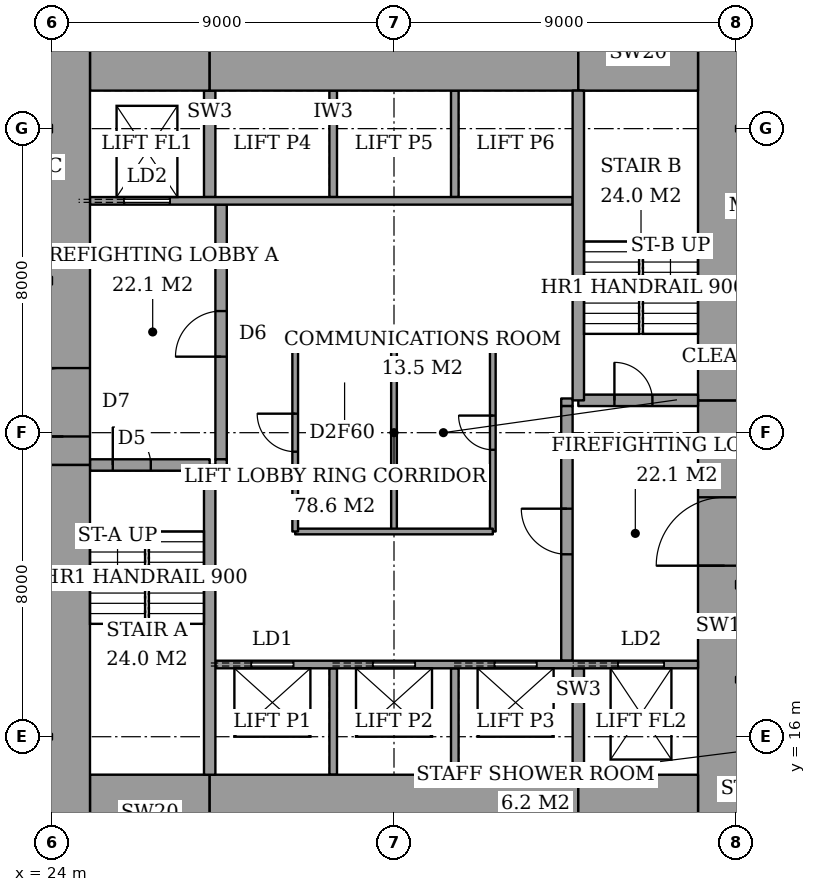
"""IFC4 building model, lengths in metres.
Left out: names, types, materials, properties, quantities, classifications, styles, units other than length and angle.
Written with IfcOpenShell. Run it as: python <this file> out.ifc"""

import sys

from ifc_helpers import new_model, si_unit, direction, frame, frame_2d, origin, place, context, subcontext, project, spatial, rectangle, extrude, element, fill, save


model = new_model("IFC4")
c1 = context("Model", 3, precision=1e-05, world=origin(), true_north=direction((0.0, 1.0)))
c2 = subcontext(c1, "Body", "Model", "MODEL_VIEW")
j1 = project(units=[si_unit("LENGTHUNIT", "METRE"), si_unit("PLANEANGLEUNIT", "RADIAN")], contexts=[c1])
p1 = place(None, origin())
s1 = spatial("IfcSite", under=j1, at=p1, CompositionType="ELEMENT")
p2 = place(p1, origin())
s2 = spatial("IfcBuilding", under=s1, at=p2, CompositionType="ELEMENT")
p3 = place(p2, frame((0.0, 0.0, 153.8)))
s3 = spatial("IfcBuildingStorey", under=s2, at=p3, CompositionType="ELEMENT", Elevation=153.8)
p4 = place(p3, frame((25.0, 14.0, 0.0), z_axis=(0.0, 0.0, 1.0), x_axis=(1.0, 0.0, 0.0)))
e1 = element("IfcWall", 1, at=p4, inside=s3, PredefinedType="SHEAR", context=c2, shape_type="SweptSolid", body=[
    extrude(rectangle(XDim=3.15, YDim=2.0, at=frame_2d((1.575, 0.0))), origin(), (0.0, 0.0, 1.0), 3.6),
])
p5 = place(p3, frame((28.15, 14.0, 0.0), z_axis=(0.0, 0.0, 1.0), x_axis=(1.0, 0.0, 0.0)))
e2 = element("IfcWall", 2, at=p5, inside=s3, PredefinedType="SHEAR", context=c2, shape_type="SweptSolid", body=[
    extrude(rectangle(XDim=9.7, YDim=2.0, at=frame_2d((4.85, 0.0))), origin(), (0.0, 0.0, 1.0), 3.6),
])
for number, where, z_axis, x_axis in (
    (3, (37.85, 14.0, 0.0), (0.0, 0.0, 1.0), (1.0, 0.0, 0.0)),
    (4, (25.0, 34.0, 0.0), (0.0, 0.0, 1.0), (1.0, 0.0, 0.0)),
):
    element("IfcWall", number, at=place(p3, frame(where, z_axis=z_axis, x_axis=x_axis)), inside=s3, PredefinedType="SHEAR", context=c2, shape_type="SweptSolid", body=[
        extrude(rectangle(XDim=3.15, YDim=2.0, at=frame_2d((1.575, 0.0))), origin(), (0.0, 0.0, 1.0), 3.6),
    ])
p6 = place(p3, frame((28.15, 34.0, 0.0), z_axis=(0.0, 0.0, 1.0), x_axis=(1.0, 0.0, 0.0)))
e5 = element("IfcWall", 5, at=p6, inside=s3, PredefinedType="SHEAR", context=c2, shape_type="SweptSolid", body=[
    extrude(rectangle(XDim=9.7, YDim=2.0, at=frame_2d((4.85, 0.0))), origin(), (0.0, 0.0, 1.0), 3.6),
])
p7 = place(p3, frame((37.85, 34.0, 0.0), z_axis=(0.0, 0.0, 1.0), x_axis=(1.0, 0.0, 0.0)))
e6 = element("IfcWall", 6, at=p7, inside=s3, PredefinedType="SHEAR", context=c2, shape_type="SweptSolid", body=[
    extrude(rectangle(XDim=3.15, YDim=2.0, at=frame_2d((1.575, 0.0))), origin(), (0.0, 0.0, 1.0), 3.6),
])
p8 = place(p3, frame((24.3, 13.0, 0.0), z_axis=(0.0, 0.0, 1.0), x_axis=(0.0, 1.0, 0.0)))
e7 = element("IfcWall", 7, at=p8, inside=s3, PredefinedType="SHEAR", context=c2, shape_type="SweptSolid", body=[
    extrude(rectangle(XDim=10.15, YDim=1.4, at=frame_2d((5.075, 0.0))), origin(), (0.0, 0.0, 1.0), 3.6),
])
p9 = place(p3, frame((24.3, 23.15, 0.0), z_axis=(0.0, 0.0, 1.0), x_axis=(0.0, 1.0, 0.0)))
e8 = element("IfcWall", 8, at=p9, inside=s3, PredefinedType="SHEAR", context=c2, shape_type="SweptSolid", body=[
    extrude(rectangle(XDim=11.85, YDim=1.4, at=frame_2d((5.925, 0.0))), origin(), (0.0, 0.0, 1.0), 3.6),
])
p10 = place(p9, frame((0.75, 0.0, 0.0)))
e9 = element("IfcOpeningElement", 9, at=p10, cuts=e8, PredefinedType="OPENING", context=c2, shape_type="SweptSolid", body=[
    extrude(rectangle(XDim=1.8, YDim=2.4, at=frame_2d((0.9, 1.2))), frame((0.0, 0.71, 0.0), z_axis=(0.0, -1.0, 0.0), x_axis=(1.0, 0.0, 0.0)), (0.0, 0.0, 1.0), 1.42),
])
p11 = place(p3, frame((41.7, 13.0, 0.0), z_axis=(0.0, 0.0, 1.0), x_axis=(0.0, 1.0, 0.0)))
e10 = element("IfcWall", 10, at=p11, inside=s3, PredefinedType="SHEAR", context=c2, shape_type="SweptSolid", body=[
    extrude(rectangle(XDim=11.85, YDim=1.4, at=frame_2d((5.925, 0.0))), origin(), (0.0, 0.0, 1.0), 3.6),
])
p12 = place(p11, frame((7.5, 0.0, 0.0)))
e11 = element("IfcOpeningElement", 11, at=p12, cuts=e10, PredefinedType="OPENING", context=c2, shape_type="SweptSolid", body=[
    extrude(rectangle(XDim=1.8, YDim=2.4, at=frame_2d((0.9, 1.2))), frame((0.0, 0.71, 0.0), z_axis=(0.0, -1.0, 0.0), x_axis=(1.0, 0.0, 0.0)), (0.0, 0.0, 1.0), 1.42),
])
p13 = place(p3, frame((41.7, 24.85, 0.0), z_axis=(0.0, 0.0, 1.0), x_axis=(0.0, 1.0, 0.0)))
e12 = element("IfcWall", 12, at=p13, inside=s3, PredefinedType="SHEAR", context=c2, shape_type="SweptSolid", body=[
    extrude(rectangle(XDim=10.15, YDim=1.4, at=frame_2d((5.075, 0.0))), origin(), (0.0, 0.0, 1.0), 3.6),
])
p14 = place(p3, frame((28.15, 15.0, 0.0), z_axis=(0.0, 0.0, 1.0), x_axis=(0.0, 1.0, 0.0)))
e13 = element("IfcWall", 13, at=p14, inside=s3, PredefinedType="SHEAR", context=c2, shape_type="SweptSolid", body=[
    extrude(rectangle(XDim=8.15, YDim=0.3, at=frame_2d((4.075, 0.0))), origin(), (0.0, 0.0, 1.0), 3.6),
])
p15 = place(p3, frame((25.0, 23.15, 0.0), z_axis=(0.0, 0.0, 1.0), x_axis=(1.0, 0.0, 0.0)))
e14 = element("IfcWall", 14, at=p15, inside=s3, PredefinedType="SHEAR", context=c2, shape_type="SweptSolid", body=[
    extrude(rectangle(XDim=3.15, YDim=0.3, at=frame_2d((1.575, 0.0))), origin(), (0.0, 0.0, 1.0), 3.6),
])
p16 = place(p15, frame((0.6, 0.0, 0.0)))
e15 = element("IfcOpeningElement", 15, at=p16, cuts=e14, PredefinedType="OPENING", context=c2, shape_type="SweptSolid", body=[
    extrude(rectangle(XDim=1.0, YDim=2.1, at=frame_2d((0.5, 1.05))), frame((0.0, 0.16, 0.0), z_axis=(0.0, -1.0, 0.0), x_axis=(1.0, 0.0, 0.0)), (0.0, 0.0, 1.0), 0.32),
])
p17 = place(p3, frame((37.85, 24.85, 0.0), z_axis=(0.0, 0.0, 1.0), x_axis=(0.0, 1.0, 0.0)))
e16 = element("IfcWall", 16, at=p17, inside=s3, PredefinedType="SHEAR", context=c2, shape_type="SweptSolid", body=[
    extrude(rectangle(XDim=8.15, YDim=0.3, at=frame_2d((4.075, 0.0))), origin(), (0.0, 0.0, 1.0), 3.6),
])
p18 = place(p3, frame((37.85, 24.85, 0.0), z_axis=(0.0, 0.0, 1.0), x_axis=(1.0, 0.0, 0.0)))
e17 = element("IfcWall", 17, at=p18, inside=s3, PredefinedType="SHEAR", context=c2, shape_type="SweptSolid", body=[
    extrude(rectangle(XDim=3.15, YDim=0.3, at=frame_2d((1.575, 0.0))), origin(), (0.0, 0.0, 1.0), 3.6),
])
p19 = place(p18, frame((0.95, 0.0, 0.0)))
e18 = element("IfcOpeningElement", 18, at=p19, cuts=e17, PredefinedType="OPENING", context=c2, shape_type="SweptSolid", body=[
    extrude(rectangle(XDim=1.0, YDim=2.1, at=frame_2d((0.5, 1.05))), frame((0.0, 0.16, 0.0), z_axis=(0.0, -1.0, 0.0), x_axis=(1.0, 0.0, 0.0)), (0.0, 0.0, 1.0), 0.32),
])
p20 = place(p3, frame((28.45, 23.3, 0.0), z_axis=(0.0, 0.0, 1.0), x_axis=(0.0, 1.0, 0.0)))
e19 = element("IfcWall", 19, at=p20, inside=s3, PredefinedType="PARTITIONING", context=c2, shape_type="SweptSolid", body=[
    extrude(rectangle(XDim=6.7, YDim=0.3, at=frame_2d((3.35, 0.0))), origin(), (0.0, 0.0, 1.0), 3.6),
])
p21 = place(p20, frame((2.7, 0.0, 0.0)))
e20 = element("IfcOpeningElement", 20, at=p21, cuts=e19, PredefinedType="OPENING", context=c2, shape_type="SweptSolid", body=[
    extrude(rectangle(XDim=1.2, YDim=2.1, at=frame_2d((0.6, 1.05))), frame((0.0, 0.16, 0.0), z_axis=(0.0, -1.0, 0.0), x_axis=(1.0, 0.0, 0.0)), (0.0, 0.0, 1.0), 0.32),
])
p22 = place(p3, frame((37.55, 18.0, 0.0), z_axis=(0.0, 0.0, 1.0), x_axis=(0.0, 1.0, 0.0)))
e21 = element("IfcWall", 21, at=p22, inside=s3, PredefinedType="PARTITIONING", context=c2, shape_type="SweptSolid", body=[
    extrude(rectangle(XDim=6.7, YDim=0.3, at=frame_2d((3.35, 0.0))), origin(), (0.0, 0.0, 1.0), 3.6),
])
p23 = place(p22, frame((2.8, 0.0, 0.0)))
e22 = element("IfcOpeningElement", 22, at=p23, cuts=e21, PredefinedType="OPENING", context=c2, shape_type="SweptSolid", body=[
    extrude(rectangle(XDim=1.2, YDim=2.1, at=frame_2d((0.6, 1.05))), frame((0.0, 0.16, 0.0), z_axis=(0.0, -1.0, 0.0), x_axis=(1.0, 0.0, 0.0)), (0.0, 0.0, 1.0), 0.32),
])
p24 = place(p3, frame((28.3, 17.9, 0.0), z_axis=(0.0, 0.0, 1.0), x_axis=(1.0, 0.0, 0.0)))
e23 = element("IfcWall", 23, at=p24, inside=s3, PredefinedType="PARTITIONING", context=c2, shape_type="SweptSolid", body=[
    extrude(rectangle(XDim=12.7, YDim=0.2, at=frame_2d((6.35, 0.0))), origin(), (0.0, 0.0, 1.0), 3.6),
])
p25 = place(p24, frame((0.95, 0.0, 0.0)))
e24 = element("IfcOpeningElement", 24, at=p25, cuts=e23, PredefinedType="OPENING", context=c2, shape_type="SweptSolid", body=[
    extrude(rectangle(XDim=1.1, YDim=2.1, at=frame_2d((0.55, 1.05))), frame((0.0, 0.11, 0.0), z_axis=(0.0, -1.0, 0.0), x_axis=(1.0, 0.0, 0.0)), (0.0, 0.0, 1.0), 0.22),
])
p26 = place(p24, frame((4.15, 0.0, 0.0)))
e25 = element("IfcOpeningElement", 25, at=p26, cuts=e23, PredefinedType="OPENING", context=c2, shape_type="SweptSolid", body=[
    extrude(rectangle(XDim=1.1, YDim=2.1, at=frame_2d((0.55, 1.05))), frame((0.0, 0.11, 0.0), z_axis=(0.0, -1.0, 0.0), x_axis=(1.0, 0.0, 0.0)), (0.0, 0.0, 1.0), 0.22),
])
p27 = place(p24, frame((7.35, 0.0, 0.0)))
e26 = element("IfcOpeningElement", 26, at=p27, cuts=e23, PredefinedType="OPENING", context=c2, shape_type="SweptSolid", body=[
    extrude(rectangle(XDim=1.1, YDim=2.1, at=frame_2d((0.55, 1.05))), frame((0.0, 0.11, 0.0), z_axis=(0.0, -1.0, 0.0), x_axis=(1.0, 0.0, 0.0)), (0.0, 0.0, 1.0), 0.22),
])
p28 = place(p24, frame((10.6, 0.0, 0.0)))
e27 = element("IfcOpeningElement", 27, at=p28, cuts=e23, PredefinedType="OPENING", context=c2, shape_type="SweptSolid", body=[
    extrude(rectangle(XDim=1.2, YDim=2.1, at=frame_2d((0.6, 1.05))), frame((0.0, 0.11, 0.0), z_axis=(0.0, -1.0, 0.0), x_axis=(1.0, 0.0, 0.0)), (0.0, 0.0, 1.0), 0.22),
])
p29 = place(p3, frame((25.0, 30.1, 0.0), z_axis=(0.0, 0.0, 1.0), x_axis=(1.0, 0.0, 0.0)))
e28 = element("IfcWall", 28, at=p29, inside=s3, PredefinedType="PARTITIONING", context=c2, shape_type="SweptSolid", body=[
    extrude(rectangle(XDim=12.7, YDim=0.2, at=frame_2d((6.35, 0.0))), origin(), (0.0, 0.0, 1.0), 3.6),
])
p30 = place(p29, frame((0.9, 0.0, 0.0)))
e29 = element("IfcOpeningElement", 29, at=p30, cuts=e28, PredefinedType="OPENING", context=c2, shape_type="SweptSolid", body=[
    extrude(rectangle(XDim=1.2, YDim=2.1, at=frame_2d((0.6, 1.05))), frame((0.0, 0.11, 0.0), z_axis=(0.0, -1.0, 0.0), x_axis=(1.0, 0.0, 0.0)), (0.0, 0.0, 1.0), 0.22),
])
for number, where, z_axis, x_axis in (
    (30, (31.4, 15.0, 0.0), (0.0, 0.0, 1.0), (0.0, 1.0, 0.0)),
    (31, (34.6, 15.0, 0.0), (0.0, 0.0, 1.0), (0.0, 1.0, 0.0)),
):
    element("IfcWall", number, at=place(p3, frame(where, z_axis=z_axis, x_axis=x_axis)), inside=s3, PredefinedType="PARTITIONING", context=c2, shape_type="SweptSolid", body=[
        extrude(rectangle(XDim=2.8, YDim=0.2, at=frame_2d((1.4, 0.0))), origin(), (0.0, 0.0, 1.0), 3.6),
    ])
p31 = place(p3, frame((37.85, 15.0, 0.0), z_axis=(0.0, 0.0, 1.0), x_axis=(0.0, 1.0, 0.0)))
e32 = element("IfcWall", 32, at=p31, inside=s3, PredefinedType="SHEAR", context=c2, shape_type="SweptSolid", body=[
    extrude(rectangle(XDim=2.8, YDim=0.3, at=frame_2d((1.4, 0.0))), origin(), (0.0, 0.0, 1.0), 3.6),
])
for number, where, z_axis, x_axis in (
    (33, (31.4, 30.2, 0.0), (0.0, 0.0, 1.0), (0.0, 1.0, 0.0)),
    (34, (34.6, 30.2, 0.0), (0.0, 0.0, 1.0), (0.0, 1.0, 0.0)),
):
    element("IfcWall", number, at=place(p3, frame(where, z_axis=z_axis, x_axis=x_axis)), inside=s3, PredefinedType="PARTITIONING", context=c2, shape_type="SweptSolid", body=[
        extrude(rectangle(XDim=2.8, YDim=0.2, at=frame_2d((1.4, 0.0))), origin(), (0.0, 0.0, 1.0), 3.6),
    ])
p32 = place(p3, frame((28.15, 30.2, 0.0), z_axis=(0.0, 0.0, 1.0), x_axis=(0.0, 1.0, 0.0)))
e35 = element("IfcWall", 35, at=p32, inside=s3, PredefinedType="SHEAR", context=c2, shape_type="SweptSolid", body=[
    extrude(rectangle(XDim=2.8, YDim=0.3, at=frame_2d((1.4, 0.0))), origin(), (0.0, 0.0, 1.0), 3.6),
])
for number, where, z_axis, x_axis in (
    (36, (28.3, 23.2, 0.0), (0.0, 0.0, 1.0), (1.0, 0.0, 0.0)),
    (37, (37.4, 24.8, 0.0), (0.0, 0.0, 1.0), (1.0, 0.0, 0.0)),
):
    element("IfcWall", number, at=place(p3, frame(where, z_axis=z_axis, x_axis=x_axis)), inside=s3, PredefinedType="PARTITIONING", context=c2, shape_type="SweptSolid", body=[
        extrude(rectangle(XDim=0.3, YDim=0.2, at=frame_2d((0.15, 0.0))), origin(), (0.0, 0.0, 1.0), 3.6),
    ])
for number, where, z_axis, x_axis in (
    (38, (30.4, 21.4, 0.0), (0.0, 0.0, 1.0), (1.0, 0.0, 0.0)),
    (39, (30.4, 26.6, 0.0), (0.0, 0.0, 1.0), (1.0, 0.0, 0.0)),
):
    element("IfcWall", number, at=place(p3, frame(where, z_axis=z_axis, x_axis=x_axis)), inside=s3, PredefinedType="PARTITIONING", context=c2, shape_type="SweptSolid", body=[
        extrude(rectangle(XDim=5.2, YDim=0.15, at=frame_2d((2.6, 0.0))), origin(), (0.0, 0.0, 1.0), 3.35),
    ])
p33 = place(p3, frame((30.4, 21.4, 0.0), z_axis=(0.0, 0.0, 1.0), x_axis=(0.0, 1.0, 0.0)))
e40 = element("IfcWall", 40, at=p33, inside=s3, PredefinedType="PARTITIONING", context=c2, shape_type="SweptSolid", body=[
    extrude(rectangle(XDim=5.2, YDim=0.15, at=frame_2d((2.6, 0.0))), origin(), (0.0, 0.0, 1.0), 3.35),
])
p34 = place(p33, frame((2.1, 0.0, 0.0)))
e41 = element("IfcOpeningElement", 41, at=p34, cuts=e40, PredefinedType="OPENING", context=c2, shape_type="SweptSolid", body=[
    extrude(rectangle(XDim=1.0, YDim=2.1, at=frame_2d((0.5, 1.05))), frame((0.0, 0.085, 0.0), z_axis=(0.0, -1.0, 0.0), x_axis=(1.0, 0.0, 0.0)), (0.0, 0.0, 1.0), 0.17),
])
p35 = place(p3, frame((35.6, 21.4, 0.0), z_axis=(0.0, 0.0, 1.0), x_axis=(0.0, 1.0, 0.0)))
e42 = element("IfcWall", 42, at=p35, inside=s3, PredefinedType="PARTITIONING", context=c2, shape_type="SweptSolid", body=[
    extrude(rectangle(XDim=5.2, YDim=0.15, at=frame_2d((2.6, 0.0))), origin(), (0.0, 0.0, 1.0), 3.35),
])
p36 = place(p35, frame((2.15, 0.0, 0.0)))
e43 = element("IfcOpeningElement", 43, at=p36, cuts=e42, PredefinedType="OPENING", context=c2, shape_type="SweptSolid", body=[
    extrude(rectangle(XDim=0.9, YDim=2.1, at=frame_2d((0.45, 1.05))), frame((0.0, 0.085, 0.0), z_axis=(0.0, -1.0, 0.0), x_axis=(1.0, 0.0, 0.0)), (0.0, 0.0, 1.0), 0.17),
])
p37 = place(p3, frame((33.0, 21.4, 0.0), z_axis=(0.0, 0.0, 1.0), x_axis=(0.0, 1.0, 0.0)))
e44 = element("IfcWall", 44, at=p37, inside=s3, PredefinedType="PARTITIONING", context=c2, shape_type="SweptSolid", body=[
    extrude(rectangle(XDim=5.2, YDim=0.15, at=frame_2d((2.6, 0.0))), origin(), (0.0, 0.0, 1.0), 3.35),
])
p38 = place(p16, origin())
e45 = element("IfcDoor", 45, at=p38, inside=s3, OperationType="SINGLE_SWING_RIGHT", PredefinedType="DOOR", context=c2, shape_type="SweptSolid", body=[
    extrude(rectangle(XDim=1.0, YDim=2.1, at=frame_2d((0.5, 1.05))), frame((0.0, 0.025, 0.0), z_axis=(0.0, -1.0, 0.0), x_axis=(1.0, 0.0, 0.0)), (0.0, 0.0, 1.0), 0.05),
])
fill(e15, e45)
p39 = place(p19, origin())
e46 = element("IfcDoor", 46, at=p39, inside=s3, OperationType="SINGLE_SWING_RIGHT", PredefinedType="DOOR", context=c2, shape_type="SweptSolid", body=[
    extrude(rectangle(XDim=1.0, YDim=2.1, at=frame_2d((0.5, 1.05))), frame((0.0, 0.025, 0.0), z_axis=(0.0, -1.0, 0.0), x_axis=(1.0, 0.0, 0.0)), (0.0, 0.0, 1.0), 0.05),
])
fill(e18, e46)
p40 = place(p21, origin())
e47 = element("IfcDoor", 47, at=p40, inside=s3, OperationType="SINGLE_SWING_RIGHT", PredefinedType="DOOR", context=c2, shape_type="SweptSolid", body=[
    extrude(rectangle(XDim=1.2, YDim=2.1, at=frame_2d((0.6, 1.05))), frame((0.0, 0.025, 0.0), z_axis=(0.0, -1.0, 0.0), x_axis=(1.0, 0.0, 0.0)), (0.0, 0.0, 1.0), 0.05),
])
fill(e20, e47)
p41 = place(p23, origin())
e48 = element("IfcDoor", 48, at=p41, inside=s3, OperationType="SINGLE_SWING_LEFT", PredefinedType="DOOR", context=c2, shape_type="SweptSolid", body=[
    extrude(rectangle(XDim=1.2, YDim=2.1, at=frame_2d((0.6, 1.05))), frame((0.0, 0.025, 0.0), z_axis=(0.0, -1.0, 0.0), x_axis=(1.0, 0.0, 0.0)), (0.0, 0.0, 1.0), 0.05),
])
fill(e22, e48)
p42 = place(p10, origin())
e49 = element("IfcDoor", 49, at=p42, inside=s3, OperationType="DOUBLE_DOOR_DOUBLE_SWING", PredefinedType="DOOR", context=c2, shape_type="SweptSolid", body=[
    extrude(rectangle(XDim=1.8, YDim=2.4, at=frame_2d((0.9, 1.2))), frame((0.0, 0.025, 0.0), z_axis=(0.0, -1.0, 0.0), x_axis=(1.0, 0.0, 0.0)), (0.0, 0.0, 1.0), 0.05),
])
fill(e9, e49)
p43 = place(p12, origin())
e50 = element("IfcDoor", 50, at=p43, inside=s3, OperationType="DOUBLE_DOOR_DOUBLE_SWING", PredefinedType="DOOR", context=c2, shape_type="SweptSolid", body=[
    extrude(rectangle(XDim=1.8, YDim=2.4, at=frame_2d((0.9, 1.2))), frame((0.0, 0.025, 0.0), z_axis=(0.0, -1.0, 0.0), x_axis=(1.0, 0.0, 0.0)), (0.0, 0.0, 1.0), 0.05),
])
fill(e11, e50)
p44 = place(p34, origin())
e51 = element("IfcDoor", 51, at=p44, inside=s3, OperationType="SINGLE_SWING_LEFT", PredefinedType="DOOR", context=c2, shape_type="SweptSolid", body=[
    extrude(rectangle(XDim=1.0, YDim=2.1, at=frame_2d((0.5, 1.05))), frame((0.0, 0.025, 0.0), z_axis=(0.0, -1.0, 0.0), x_axis=(1.0, 0.0, 0.0)), (0.0, 0.0, 1.0), 0.05),
])
fill(e41, e51)
p45 = place(p36, origin())
e52 = element("IfcDoor", 52, at=p45, inside=s3, OperationType="SINGLE_SWING_LEFT", PredefinedType="DOOR", context=c2, shape_type="SweptSolid", body=[
    extrude(rectangle(XDim=0.9, YDim=2.1, at=frame_2d((0.45, 1.05))), frame((0.0, 0.025, 0.0), z_axis=(0.0, -1.0, 0.0), x_axis=(1.0, 0.0, 0.0)), (0.0, 0.0, 1.0), 0.05),
])
fill(e43, e52)
p46 = place(p25, origin())
e53 = element("IfcDoor", 53, at=p46, inside=s3, OperationType="SLIDING_TO_LEFT", PredefinedType="DOOR", context=c2, shape_type="SweptSolid", body=[
    extrude(rectangle(XDim=1.1, YDim=2.1, at=frame_2d((0.55, 1.05))), frame((0.0, 0.025, 0.0), z_axis=(0.0, -1.0, 0.0), x_axis=(1.0, 0.0, 0.0)), (0.0, 0.0, 1.0), 0.05),
])
fill(e24, e53)
p47 = place(p26, origin())
e54 = element("IfcDoor", 54, at=p47, inside=s3, OperationType="SLIDING_TO_LEFT", PredefinedType="DOOR", context=c2, shape_type="SweptSolid", body=[
    extrude(rectangle(XDim=1.1, YDim=2.1, at=frame_2d((0.55, 1.05))), frame((0.0, 0.025, 0.0), z_axis=(0.0, -1.0, 0.0), x_axis=(1.0, 0.0, 0.0)), (0.0, 0.0, 1.0), 0.05),
])
fill(e25, e54)
p48 = place(p27, origin())
e55 = element("IfcDoor", 55, at=p48, inside=s3, OperationType="SLIDING_TO_LEFT", PredefinedType="DOOR", context=c2, shape_type="SweptSolid", body=[
    extrude(rectangle(XDim=1.1, YDim=2.1, at=frame_2d((0.55, 1.05))), frame((0.0, 0.025, 0.0), z_axis=(0.0, -1.0, 0.0), x_axis=(1.0, 0.0, 0.0)), (0.0, 0.0, 1.0), 0.05),
])
fill(e26, e55)
p49 = place(p30, origin())
e56 = element("IfcDoor", 56, at=p49, inside=s3, OperationType="SLIDING_TO_LEFT", PredefinedType="DOOR", context=c2, shape_type="SweptSolid", body=[
    extrude(rectangle(XDim=1.2, YDim=2.1, at=frame_2d((0.6, 1.05))), frame((0.0, 0.025, 0.0), z_axis=(0.0, -1.0, 0.0), x_axis=(1.0, 0.0, 0.0)), (0.0, 0.0, 1.0), 0.05),
])
fill(e29, e56)
p50 = place(p28, origin())
e57 = element("IfcDoor", 57, at=p50, inside=s3, OperationType="SLIDING_TO_LEFT", PredefinedType="DOOR", context=c2, shape_type="SweptSolid", body=[
    extrude(rectangle(XDim=1.2, YDim=2.1, at=frame_2d((0.6, 1.05))), frame((0.0, 0.025, 0.0), z_axis=(0.0, -1.0, 0.0), x_axis=(1.0, 0.0, 0.0)), (0.0, 0.0, 1.0), 0.05),
])
fill(e27, e57)
save(model, sys.argv[1])
